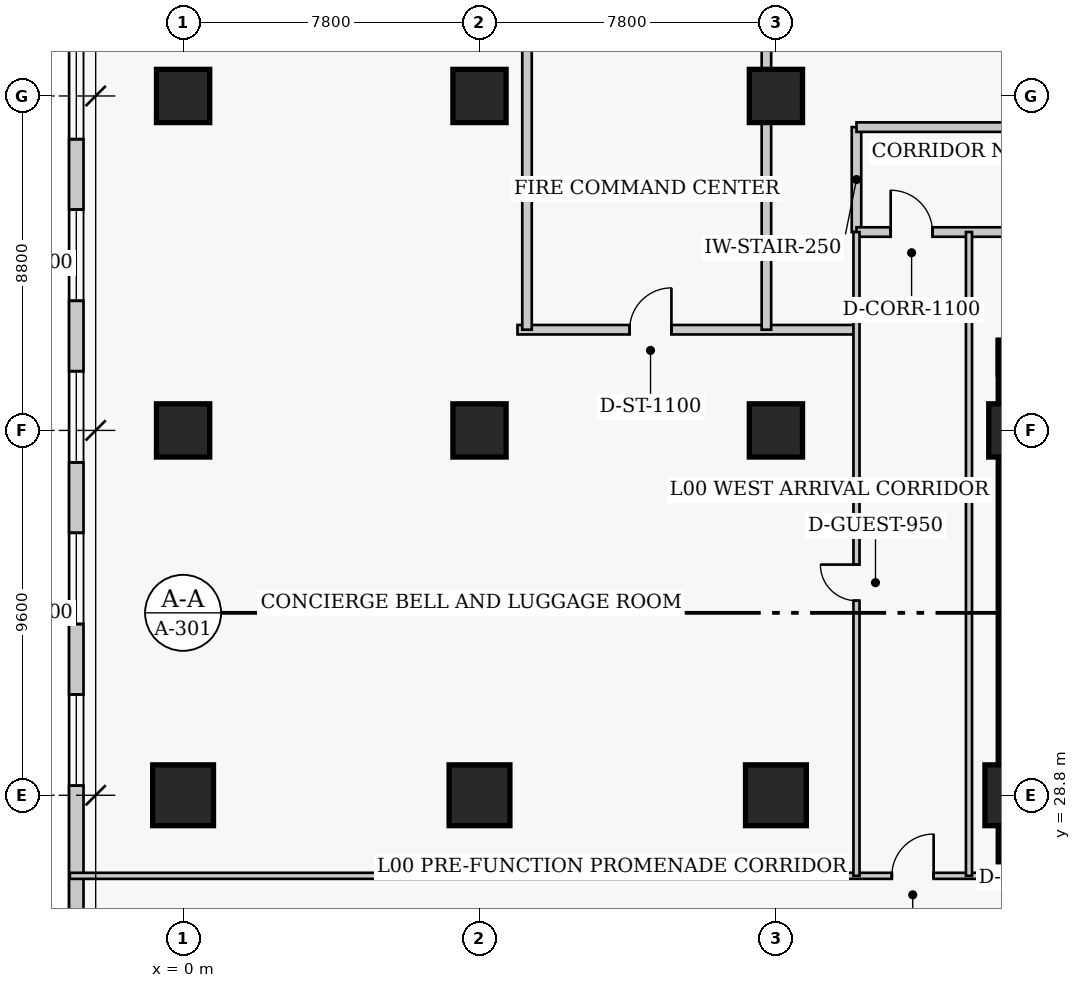
"""IFC4 building model, lengths in metres.
Left out: names, types, materials, properties, quantities, classifications, styles, units other than length and angle.
Written with IfcOpenShell. Run it as: python <this file> out.ifc"""

import sys

from ifc_helpers import new_model, si_unit, direction, frame, frame_2d, origin, origin_2d, place, context, subcontext, project, spatial, rectangle, extrude, element, fill, save


model = new_model("IFC4")
c1 = context("Model", 3, precision=1e-05, world=origin(), true_north=direction((0.0, 1.0)))
c2 = subcontext(c1, "Body", "Model", "MODEL_VIEW")
j1 = project(units=[si_unit("LENGTHUNIT", "METRE"), si_unit("PLANEANGLEUNIT", "RADIAN")], contexts=[c1])
p1 = place(None, origin())
s1 = spatial("IfcSite", under=j1, at=p1, CompositionType="ELEMENT")
p2 = place(p1, origin())
s2 = spatial("IfcBuilding", under=s1, at=p2, CompositionType="ELEMENT")
p3 = place(p2, origin())
s3 = spatial("IfcBuildingStorey", under=s2, at=p3, CompositionType="ELEMENT", Elevation=0.0)
p4 = place(p3, frame((21.45, 40.32, 0.0), z_axis=(0.0, 0.0, 1.0), x_axis=(1.0, 0.0, 0.0)))
e1 = element("IfcWall", 1, at=p4, inside=s3, PredefinedType="SHEAR", context=c2, shape_type="SweptSolid", body=[
    extrude(rectangle(XDim=14.4, YDim=0.9, at=frame_2d((7.2, 0.0))), origin(), (0.0, 0.0, 1.0), 5.4),
])
p5 = place(p4, frame((1.35, 0.0, 0.0)))
e2 = element("IfcOpeningElement", 2, at=p5, cuts=e1, PredefinedType="OPENING", context=c2, shape_type="SweptSolid", body=[
    extrude(rectangle(XDim=1.1, YDim=2.15, at=frame_2d((0.55, 1.075))), frame((0.0, 0.46, 0.0), z_axis=(0.0, -1.0, 0.0), x_axis=(1.0, 0.0, 0.0)), (0.0, 0.0, 1.0), 0.92),
])
p6 = place(p3, frame((21.9, 27.05, 0.0), z_axis=(0.0, 0.0, 1.0), x_axis=(0.0, 1.0, 0.0)))
e3 = element("IfcWall", 3, at=p6, inside=s3, PredefinedType="SHEAR", context=c2, shape_type="SweptSolid", body=[
    extrude(rectangle(XDim=13.72, YDim=0.9, at=frame_2d((6.86, 0.0))), origin(), (0.0, 0.0, 1.0), 5.4),
])
p7 = place(p3, frame((0.0, 28.8, 0.0), z_axis=(0.0, 0.0, 1.0), x_axis=(1.0, 0.0, 0.0)))
e4 = element("IfcColumn", 4, at=p7, inside=s3, PredefinedType="COLUMN", context=c2, shape_type="SweptSolid", body=[
    extrude(rectangle(XDim=1.6, YDim=1.6, at=origin_2d()), origin(), (0.0, 0.0, 1.0), 5.4),
])
for number, where, z_axis, x_axis in (
    (5, (0.0, 38.4, 0.0), (0.0, 0.0, 1.0), (1.0, 0.0, 0.0)),
    (6, (0.0, 47.2, 0.0), (0.0, 0.0, 1.0), (1.0, 0.0, 0.0)),
):
    element("IfcColumn", number, at=place(p3, frame(where, z_axis=z_axis, x_axis=x_axis)), inside=s3, PredefinedType="COLUMN", context=c2, shape_type="SweptSolid", body=[
        extrude(rectangle(XDim=1.4, YDim=1.4, at=origin_2d()), origin(), (0.0, 0.0, 1.0), 5.4),
    ])
p8 = place(p3, frame((7.8, 28.8, 0.0), z_axis=(0.0, 0.0, 1.0), x_axis=(1.0, 0.0, 0.0)))
e7 = element("IfcColumn", 7, at=p8, inside=s3, PredefinedType="COLUMN", context=c2, shape_type="SweptSolid", body=[
    extrude(rectangle(XDim=1.6, YDim=1.6, at=origin_2d()), origin(), (0.0, 0.0, 1.0), 5.4),
])
for number, where, z_axis, x_axis in (
    (8, (7.8, 38.4, 0.0), (0.0, 0.0, 1.0), (1.0, 0.0, 0.0)),
    (9, (7.8, 47.2, 0.0), (0.0, 0.0, 1.0), (1.0, 0.0, 0.0)),
):
    element("IfcColumn", number, at=place(p3, frame(where, z_axis=z_axis, x_axis=x_axis)), inside=s3, PredefinedType="COLUMN", context=c2, shape_type="SweptSolid", body=[
        extrude(rectangle(XDim=1.4, YDim=1.4, at=origin_2d()), origin(), (0.0, 0.0, 1.0), 5.4),
    ])
p9 = place(p3, frame((15.6, 28.8, 0.0), z_axis=(0.0, 0.0, 1.0), x_axis=(1.0, 0.0, 0.0)))
e10 = element("IfcColumn", 10, at=p9, inside=s3, PredefinedType="COLUMN", context=c2, shape_type="SweptSolid", body=[
    extrude(rectangle(XDim=1.6, YDim=1.6, at=origin_2d()), origin(), (0.0, 0.0, 1.0), 5.4),
])
for number, where, z_axis, x_axis in (
    (11, (15.6, 38.4, 0.0), (0.0, 0.0, 1.0), (1.0, 0.0, 0.0)),
    (12, (15.6, 47.2, 0.0), (0.0, 0.0, 1.0), (1.0, 0.0, 0.0)),
):
    element("IfcColumn", number, at=place(p3, frame(where, z_axis=z_axis, x_axis=x_axis)), inside=s3, PredefinedType="COLUMN", context=c2, shape_type="SweptSolid", body=[
        extrude(rectangle(XDim=1.4, YDim=1.4, at=origin_2d()), origin(), (0.0, 0.0, 1.0), 5.4),
    ])
p10 = place(p3, frame((21.9, 28.8, 0.0), z_axis=(0.0, 0.0, 1.0), x_axis=(1.0, 0.0, 0.0)))
e13 = element("IfcColumn", 13, at=p10, inside=s3, PredefinedType="COLUMN", context=c2, shape_type="SweptSolid", body=[
    extrude(rectangle(XDim=1.6, YDim=1.6, at=origin_2d()), origin(), (0.0, 0.0, 1.0), 5.4),
])
p11 = place(p3, frame((21.9, 38.4, 0.0), z_axis=(0.0, 0.0, 1.0), x_axis=(1.0, 0.0, 0.0)))
e14 = element("IfcColumn", 14, at=p11, inside=s3, PredefinedType="COLUMN", context=c2, shape_type="SweptSolid", body=[
    extrude(rectangle(XDim=1.4, YDim=1.4, at=origin_2d()), origin(), (0.0, 0.0, 1.0), 5.4),
])
p12 = place(p3, frame((-2.81, 2.61, 0.0), z_axis=(0.0, 0.0, 1.0), x_axis=(0.0, 1.0, 0.0)))
e15 = element("IfcWall", 15, at=p12, inside=s3, PredefinedType="SOLIDWALL", context=c2, shape_type="SweptSolid", body=[
    extrude(rectangle(XDim=46.78, YDim=0.38, at=frame_2d((23.39, 0.0))), origin(), (0.0, 0.0, 1.0), 5.1),
])
p13 = place(p12, frame((0.927, 0.0, 0.75)))
e16 = element("IfcOpeningElement", 16, at=p13, cuts=e15, PredefinedType="OPENING", context=c2, shape_type="SweptSolid", body=[
    extrude(rectangle(XDim=2.4, YDim=2.2, at=frame_2d((1.2, 1.1))), frame((0.0, 0.2, 0.0), z_axis=(0.0, -1.0, 0.0), x_axis=(1.0, 0.0, 0.0)), (0.0, 0.0, 1.0), 0.4),
])
p14 = place(p12, frame((5.179, 0.0, 0.75)))
e17 = element("IfcOpeningElement", 17, at=p14, cuts=e15, PredefinedType="OPENING", context=c2, shape_type="SweptSolid", body=[
    extrude(rectangle(XDim=2.4, YDim=2.2, at=frame_2d((1.2, 1.1))), frame((0.0, 0.2, 0.0), z_axis=(0.0, -1.0, 0.0), x_axis=(1.0, 0.0, 0.0)), (0.0, 0.0, 1.0), 0.4),
])
p15 = place(p12, frame((9.432, 0.0, 0.75)))
e18 = element("IfcOpeningElement", 18, at=p15, cuts=e15, PredefinedType="OPENING", context=c2, shape_type="SweptSolid", body=[
    extrude(rectangle(XDim=2.4, YDim=2.2, at=frame_2d((1.2, 1.1))), frame((0.0, 0.2, 0.0), z_axis=(0.0, -1.0, 0.0), x_axis=(1.0, 0.0, 0.0)), (0.0, 0.0, 1.0), 0.4),
])
p16 = place(p12, frame((13.685, 0.0, 0.75)))
e19 = element("IfcOpeningElement", 19, at=p16, cuts=e15, PredefinedType="OPENING", context=c2, shape_type="SweptSolid", body=[
    extrude(rectangle(XDim=2.4, YDim=2.2, at=frame_2d((1.2, 1.1))), frame((0.0, 0.2, 0.0), z_axis=(0.0, -1.0, 0.0), x_axis=(1.0, 0.0, 0.0)), (0.0, 0.0, 1.0), 0.4),
])
p17 = place(p12, frame((17.937, 0.0, 0.75)))
e20 = element("IfcOpeningElement", 20, at=p17, cuts=e15, PredefinedType="OPENING", context=c2, shape_type="SweptSolid", body=[
    extrude(rectangle(XDim=2.4, YDim=2.2, at=frame_2d((1.2, 1.1))), frame((0.0, 0.2, 0.0), z_axis=(0.0, -1.0, 0.0), x_axis=(1.0, 0.0, 0.0)), (0.0, 0.0, 1.0), 0.4),
])
p18 = place(p12, frame((26.443, 0.0, 0.75)))
e21 = element("IfcOpeningElement", 21, at=p18, cuts=e15, PredefinedType="OPENING", context=c2, shape_type="SweptSolid", body=[
    extrude(rectangle(XDim=2.4, YDim=2.2, at=frame_2d((1.2, 1.1))), frame((0.0, 0.2, 0.0), z_axis=(0.0, -1.0, 0.0), x_axis=(1.0, 0.0, 0.0)), (0.0, 0.0, 1.0), 0.4),
])
p19 = place(p12, frame((30.696, 0.0, 0.75)))
e22 = element("IfcOpeningElement", 22, at=p19, cuts=e15, PredefinedType="OPENING", context=c2, shape_type="SweptSolid", body=[
    extrude(rectangle(XDim=2.4, YDim=2.2, at=frame_2d((1.2, 1.1))), frame((0.0, 0.2, 0.0), z_axis=(0.0, -1.0, 0.0), x_axis=(1.0, 0.0, 0.0)), (0.0, 0.0, 1.0), 0.4),
])
p20 = place(p12, frame((34.948, 0.0, 0.75)))
e23 = element("IfcOpeningElement", 23, at=p20, cuts=e15, PredefinedType="OPENING", context=c2, shape_type="SweptSolid", body=[
    extrude(rectangle(XDim=2.4, YDim=2.2, at=frame_2d((1.2, 1.1))), frame((0.0, 0.2, 0.0), z_axis=(0.0, -1.0, 0.0), x_axis=(1.0, 0.0, 0.0)), (0.0, 0.0, 1.0), 0.4),
])
p21 = place(p12, frame((39.201, 0.0, 0.75)))
e24 = element("IfcOpeningElement", 24, at=p21, cuts=e15, PredefinedType="OPENING", context=c2, shape_type="SweptSolid", body=[
    extrude(rectangle(XDim=2.4, YDim=2.2, at=frame_2d((1.2, 1.1))), frame((0.0, 0.2, 0.0), z_axis=(0.0, -1.0, 0.0), x_axis=(1.0, 0.0, 0.0)), (0.0, 0.0, 1.0), 0.4),
])
p22 = place(p12, frame((43.454, 0.0, 0.75)))
e25 = element("IfcOpeningElement", 25, at=p22, cuts=e15, PredefinedType="OPENING", context=c2, shape_type="SweptSolid", body=[
    extrude(rectangle(XDim=2.4, YDim=2.2, at=frame_2d((1.2, 1.1))), frame((0.0, 0.2, 0.0), z_axis=(0.0, -1.0, 0.0), x_axis=(1.0, 0.0, 0.0)), (0.0, 0.0, 1.0), 0.4),
])
p23 = place(p3, frame((-2.98, 26.68, 0.0), z_axis=(0.0, 0.0, 1.0), x_axis=(1.0, 0.0, 0.0)))
e26 = element("IfcWall", 26, at=p23, inside=s3, PredefinedType="PARTITIONING", context=c2, shape_type="SweptSolid", body=[
    extrude(rectangle(XDim=83.96, YDim=0.16, at=frame_2d((41.98, 0.0))), origin(), (0.0, 0.0, 1.0), 5.1),
])
p24 = place(p23, frame((41.08, 0.0, 0.0)))
e27 = element("IfcOpeningElement", 27, at=p24, cuts=e26, PredefinedType="OPENING", context=c2, shape_type="SweptSolid", body=[
    extrude(rectangle(XDim=1.8, YDim=2.2, at=frame_2d((0.9, 1.1))), frame((0.0, 0.09, 0.0), z_axis=(0.0, -1.0, 0.0), x_axis=(1.0, 0.0, 0.0)), (0.0, 0.0, 1.0), 0.18),
])
p25 = place(p23, frame((21.63, 0.0, 0.0)))
e28 = element("IfcOpeningElement", 28, at=p25, cuts=e26, PredefinedType="OPENING", context=c2, shape_type="SweptSolid", body=[
    extrude(rectangle(XDim=1.1, YDim=2.15, at=frame_2d((0.55, 1.075))), frame((0.0, 0.09, 0.0), z_axis=(0.0, -1.0, 0.0), x_axis=(1.0, 0.0, 0.0)), (0.0, 0.0, 1.0), 0.18),
])
p26 = place(p23, frame((68.03, 0.0, 0.0)))
e29 = element("IfcOpeningElement", 29, at=p26, cuts=e26, PredefinedType="OPENING", context=c2, shape_type="SweptSolid", body=[
    extrude(rectangle(XDim=1.9, YDim=2.25, at=frame_2d((0.95, 1.125))), frame((0.0, 0.09, 0.0), z_axis=(0.0, -1.0, 0.0), x_axis=(1.0, 0.0, 0.0)), (0.0, 0.0, 1.0), 0.18),
])
p27 = place(p3, frame((17.72, 43.62, 0.0), z_axis=(0.0, 0.0, 1.0), x_axis=(0.0, 1.0, 0.0)))
e30 = element("IfcWall", 30, at=p27, inside=s3, PredefinedType="SOLIDWALL", context=c2, shape_type="SweptSolid", body=[
    extrude(rectangle(XDim=2.76, YDim=0.25, at=frame_2d((1.38, 0.0))), origin(), (0.0, 0.0, 1.0), 5.1),
])
p28 = place(p3, frame((17.72, 46.38, 0.0), z_axis=(0.0, 0.0, 1.0), x_axis=(1.0, 0.0, 0.0)))
e31 = element("IfcWall", 31, at=p28, inside=s3, PredefinedType="SOLIDWALL", context=c2, shape_type="SweptSolid", body=[
    extrude(rectangle(XDim=8.28, YDim=0.25, at=frame_2d((4.14, 0.0))), origin(), (0.0, 0.0, 1.0), 5.1),
])
p29 = place(p3, frame((17.72, 43.62, 0.0), z_axis=(0.0, 0.0, 1.0), x_axis=(1.0, 0.0, 0.0)))
e32 = element("IfcWall", 32, at=p29, inside=s3, PredefinedType="SOLIDWALL", context=c2, shape_type="SweptSolid", body=[
    extrude(rectangle(XDim=4.43, YDim=0.25, at=frame_2d((2.215, 0.0))), origin(), (0.0, 0.0, 1.0), 5.1),
])
p30 = place(p29, frame((0.9, 0.0, 0.0)))
e33 = element("IfcOpeningElement", 33, at=p30, cuts=e32, PredefinedType="OPENING", context=c2, shape_type="SweptSolid", body=[
    extrude(rectangle(XDim=1.1, YDim=2.15, at=frame_2d((0.55, 1.075))), frame((0.0, 0.135, 0.0), z_axis=(0.0, -1.0, 0.0), x_axis=(1.0, 0.0, 0.0)), (0.0, 0.0, 1.0), 0.27),
])
p31 = place(p3, frame((8.8, 41.05, 0.0), z_axis=(0.0, 0.0, 1.0), x_axis=(1.0, 0.0, 0.0)))
e34 = element("IfcWall", 34, at=p31, inside=s3, PredefinedType="SOLIDWALL", context=c2, shape_type="SweptSolid", body=[
    extrude(rectangle(XDim=8.92, YDim=0.25, at=frame_2d((4.46, 0.0))), origin(), (0.0, 0.0, 1.0), 5.1),
])
p32 = place(p31, frame((2.95, 0.0, 0.0)))
e35 = element("IfcOpeningElement", 35, at=p32, cuts=e34, PredefinedType="OPENING", context=c2, shape_type="SweptSolid", body=[
    extrude(rectangle(XDim=1.1, YDim=2.15, at=frame_2d((0.55, 1.075))), frame((0.0, 0.135, 0.0), z_axis=(0.0, -1.0, 0.0), x_axis=(1.0, 0.0, 0.0)), (0.0, 0.0, 1.0), 0.27),
])
p33 = place(p3, frame((9.05, 41.05, 0.0), z_axis=(0.0, 0.0, 1.0), x_axis=(0.0, 1.0, 0.0)))
e36 = element("IfcWall", 36, at=p33, inside=s3, PredefinedType="SOLIDWALL", context=c2, shape_type="SweptSolid", body=[
    extrude(rectangle(XDim=10.53, YDim=0.25, at=frame_2d((5.265, 0.0))), origin(), (0.0, 0.0, 1.0), 5.1),
])
p34 = place(p3, frame((15.35, 41.05, 0.0), z_axis=(0.0, 0.0, 1.0), x_axis=(0.0, 1.0, 0.0)))
e37 = element("IfcWall", 37, at=p34, inside=s3, PredefinedType="SOLIDWALL", context=c2, shape_type="SweptSolid", body=[
    extrude(rectangle(XDim=10.53, YDim=0.25, at=frame_2d((5.265, 0.0))), origin(), (0.0, 0.0, 1.0), 4.06),
])
p35 = place(p3, frame((17.72, 26.68, 0.0), z_axis=(0.0, 0.0, 1.0), x_axis=(0.0, 1.0, 0.0)))
e38 = element("IfcWall", 38, at=p35, inside=s3, PredefinedType="PARTITIONING", context=c2, shape_type="SweptSolid", body=[
    extrude(rectangle(XDim=16.94, YDim=0.16, at=frame_2d((8.47, 0.0))), origin(), (0.0, 0.0, 1.0), 5.1),
])
p36 = place(p35, frame((7.24, 0.0, 0.0)))
e39 = element("IfcOpeningElement", 39, at=p36, cuts=e38, PredefinedType="OPENING", context=c2, shape_type="SweptSolid", body=[
    extrude(rectangle(XDim=0.95, YDim=2.1, at=frame_2d((0.475, 1.05))), frame((0.0, 0.09, 0.0), z_axis=(0.0, -1.0, 0.0), x_axis=(1.0, 0.0, 0.0)), (0.0, 0.0, 1.0), 0.18),
])
p37 = place(p3, frame((20.68, 26.68, 0.0), z_axis=(0.0, 0.0, 1.0), x_axis=(0.0, 1.0, 0.0)))
e40 = element("IfcWall", 40, at=p37, inside=s3, PredefinedType="PARTITIONING", context=c2, shape_type="SweptSolid", body=[
    extrude(rectangle(XDim=16.94, YDim=0.16, at=frame_2d((8.47, 0.0))), origin(), (0.0, 0.0, 1.0), 5.1),
])
p38 = place(p18, origin())
e41 = element("IfcWindow", 41, at=p38, inside=s3, PartitioningType="SINGLE_PANEL", PredefinedType="WINDOW", context=c2, shape_type="SweptSolid", body=[
    extrude(rectangle(XDim=2.4, YDim=2.2, at=frame_2d((1.2, 1.1))), frame((0.0, 0.03, 0.0), z_axis=(0.0, -1.0, 0.0), x_axis=(1.0, 0.0, 0.0)), (0.0, 0.0, 1.0), 0.06),
])
fill(e21, e41)
p39 = place(p19, origin())
e42 = element("IfcWindow", 42, at=p39, inside=s3, PartitioningType="SINGLE_PANEL", PredefinedType="WINDOW", context=c2, shape_type="SweptSolid", body=[
    extrude(rectangle(XDim=2.4, YDim=2.2, at=frame_2d((1.2, 1.1))), frame((0.0, 0.03, 0.0), z_axis=(0.0, -1.0, 0.0), x_axis=(1.0, 0.0, 0.0)), (0.0, 0.0, 1.0), 0.06),
])
fill(e22, e42)
p40 = place(p20, origin())
e43 = element("IfcWindow", 43, at=p40, inside=s3, PartitioningType="SINGLE_PANEL", PredefinedType="WINDOW", context=c2, shape_type="SweptSolid", body=[
    extrude(rectangle(XDim=2.4, YDim=2.2, at=frame_2d((1.2, 1.1))), frame((0.0, 0.03, 0.0), z_axis=(0.0, -1.0, 0.0), x_axis=(1.0, 0.0, 0.0)), (0.0, 0.0, 1.0), 0.06),
])
fill(e23, e43)
p41 = place(p21, origin())
e44 = element("IfcWindow", 44, at=p41, inside=s3, PartitioningType="SINGLE_PANEL", PredefinedType="WINDOW", context=c2, shape_type="SweptSolid", body=[
    extrude(rectangle(XDim=2.4, YDim=2.2, at=frame_2d((1.2, 1.1))), frame((0.0, 0.03, 0.0), z_axis=(0.0, -1.0, 0.0), x_axis=(1.0, 0.0, 0.0)), (0.0, 0.0, 1.0), 0.06),
])
fill(e24, e44)
p42 = place(p22, origin())
e45 = element("IfcWindow", 45, at=p42, inside=s3, PartitioningType="SINGLE_PANEL", PredefinedType="WINDOW", context=c2, shape_type="SweptSolid", body=[
    extrude(rectangle(XDim=2.4, YDim=2.2, at=frame_2d((1.2, 1.1))), frame((0.0, 0.03, 0.0), z_axis=(0.0, -1.0, 0.0), x_axis=(1.0, 0.0, 0.0)), (0.0, 0.0, 1.0), 0.06),
])
fill(e25, e45)
p43 = place(p25, origin())
e46 = element("IfcDoor", 46, at=p43, inside=s3, OperationType="SINGLE_SWING_RIGHT", PredefinedType="DOOR", context=c2, shape_type="SweptSolid", body=[
    extrude(rectangle(XDim=1.1, YDim=2.15, at=frame_2d((0.55, 1.075))), frame((0.0, 0.025, 0.0), z_axis=(0.0, -1.0, 0.0), x_axis=(1.0, 0.0, 0.0)), (0.0, 0.0, 1.0), 0.05),
])
fill(e28, e46)
p44 = place(p30, origin())
e47 = element("IfcDoor", 47, at=p44, inside=s3, OperationType="SINGLE_SWING_LEFT", PredefinedType="DOOR", context=c2, shape_type="SweptSolid", body=[
    extrude(rectangle(XDim=1.1, YDim=2.15, at=frame_2d((0.55, 1.075))), frame((0.0, 0.025, 0.0), z_axis=(0.0, -1.0, 0.0), x_axis=(1.0, 0.0, 0.0)), (0.0, 0.0, 1.0), 0.05),
])
fill(e33, e47)
p45 = place(p32, origin())
e48 = element("IfcDoor", 48, at=p45, inside=s3, OperationType="SINGLE_SWING_RIGHT", PredefinedType="DOOR", context=c2, shape_type="SweptSolid", body=[
    extrude(rectangle(XDim=1.1, YDim=2.15, at=frame_2d((0.55, 1.075))), frame((0.0, 0.025, 0.0), z_axis=(0.0, -1.0, 0.0), x_axis=(1.0, 0.0, 0.0)), (0.0, 0.0, 1.0), 0.05),
])
fill(e35, e48)
p46 = place(p36, origin())
e49 = element("IfcDoor", 49, at=p46, inside=s3, OperationType="SINGLE_SWING_RIGHT", PredefinedType="DOOR", context=c2, shape_type="SweptSolid", body=[
    extrude(rectangle(XDim=0.95, YDim=2.1, at=frame_2d((0.475, 1.05))), frame((0.0, 0.025, 0.0), z_axis=(0.0, -1.0, 0.0), x_axis=(1.0, 0.0, 0.0)), (0.0, 0.0, 1.0), 0.05),
])
fill(e39, e49)
save(model, sys.argv[1])
